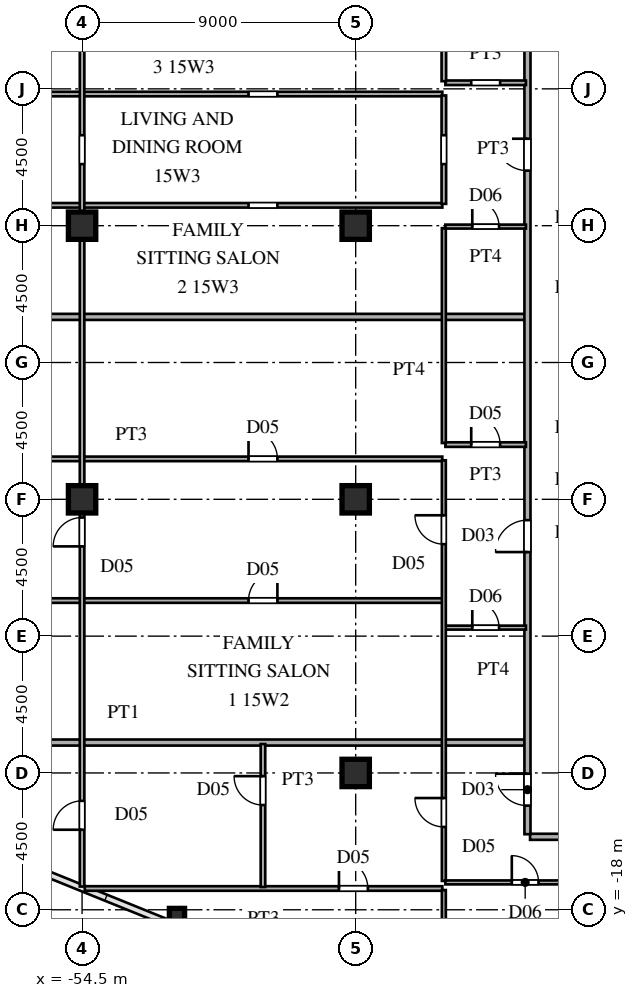
"""IFC4 building model, lengths in metres.
Left out: names, types, materials, properties, quantities, classifications, styles, units other than length and angle.
Written with IfcOpenShell. Run it as: python <this file> out.ifc"""

import sys

from ifc_helpers import new_model, si_unit, direction, frame, frame_2d, origin, origin_2d, place, context, subcontext, project, spatial, rectangle, hollow_rectangle, i_section, extrude, source, transform, mapped, element, fill, save


model = new_model("IFC4")
c1 = context("Model", 3, precision=1e-05, world=origin(), true_north=direction((0.0, 1.0)))
c2 = subcontext(c1, "Body", "Model", "MODEL_VIEW")
j1 = project(units=[si_unit("LENGTHUNIT", "METRE"), si_unit("PLANEANGLEUNIT", "RADIAN")], contexts=[c1])
p1 = place(None, origin())
s1 = spatial("IfcSite", under=j1, at=p1, CompositionType="ELEMENT")
p2 = place(p1, origin())
s2 = spatial("IfcBuilding", under=s1, at=p2, CompositionType="ELEMENT")
p3 = place(p2, frame((0.0, 0.0, 58.5)))
s3 = spatial("IfcBuildingStorey", under=s2, at=p3, CompositionType="ELEMENT", Elevation=58.5)
m1 = source(origin(), c2, "Body", "SweptSolid", [
    extrude(i_section(OverallWidth=0.9, OverallDepth=0.9, WebThickness=0.036, FlangeThickness=0.055, at=origin_2d()), origin(), (0.0, 0.0, 1.0), 3.6),
])
for number, where, z_axis, x_axis in (
    (1, (-45.5, -13.5, 0.0), (0.0, 0.0, 1.0), (1.0, 0.0, 0.0)),
    (2, (-45.5, -4.5, 0.0), (0.0, 0.0, 1.0), (1.0, 0.0, 0.0)),
    (3, (-45.5, 4.5, 0.0), (0.0, 0.0, 1.0), (1.0, 0.0, 0.0)),
    (4, (-54.5, -4.5, 0.0), (0.0, 0.0, 1.0), (1.0, 0.0, 0.0)),
    (5, (-54.5, 4.5, 0.0), (0.0, 0.0, 1.0), (1.0, 0.0, 0.0)),
):
    element("IfcColumn", number, at=place(p3, frame(where, z_axis=z_axis, x_axis=x_axis)), inside=s3, PredefinedType="COLUMN", context=c2, shape_type="MappedRepresentation", body=[
        mapped(m1, transform((0.0, 0.0, 0.0), scale=1.0)),
    ])
m2 = source(origin(), c2, "Body", "SweptSolid", [
    extrude(hollow_rectangle(XDim=0.5, YDim=0.5, WallThickness=0.02, at=origin_2d()), origin(), (0.0, 0.0, 1.0), 3.6),
])
p4 = place(p3, frame((-51.378, -18.204, 0.0), z_axis=(0.0, 0.0, 1.0), x_axis=(1.0, 0.0, 0.0)))
e6 = element("IfcColumn", 6, at=p4, inside=s3, PredefinedType="COLUMN", context=c2, shape_type="MappedRepresentation", body=[
    mapped(m2, transform((0.0, 0.0, 0.0), scale=1.0)),
])
p5 = place(p3, frame((-54.412, -17.3, 0.0), z_axis=(0.0, 0.0, 1.0), x_axis=(1.0, 0.0, 0.0)))
e7 = element("IfcWall", 7, at=p5, inside=s3, PredefinedType="PARTITIONING", context=c2, shape_type="SweptSolid", body=[
    extrude(rectangle(XDim=11.762, YDim=0.15, at=frame_2d((5.881, 0.0))), origin(), (0.0, 0.0, 1.0), 3.38),
])
p6 = place(p5, frame((8.362, 0.0, 0.0)))
e8 = element("IfcOpeningElement", 8, at=p6, cuts=e7, PredefinedType="OPENING", context=c2, shape_type="SweptSolid", body=[
    extrude(rectangle(XDim=0.95, YDim=2.15, at=frame_2d((0.475, 1.075))), frame((0.0, 0.085, 0.0), z_axis=(0.0, -1.0, 0.0), x_axis=(1.0, 0.0, 0.0)), (0.0, 0.0, 1.0), 0.17),
])
p7 = place(p3, frame((-42.55, -17.1, 0.0), z_axis=(0.0, 0.0, 1.0), x_axis=(1.0, 0.0, 0.0)))
e9 = element("IfcWall", 9, at=p7, inside=s3, PredefinedType="PARTITIONING", context=c2, shape_type="SweptSolid", body=[
    extrude(rectangle(XDim=5.25, YDim=0.13, at=frame_2d((2.625, 0.0))), origin(), (0.0, 0.0, 1.0), 3.38),
])
p8 = place(p7, frame((2.185, 0.0, 0.0)))
e10 = element("IfcOpeningElement", 10, at=p8, cuts=e9, PredefinedType="OPENING", context=c2, shape_type="SweptSolid", body=[
    extrude(rectangle(XDim=0.88, YDim=2.1, at=frame_2d((0.44, 1.05))), frame((0.0, 0.075, 0.0), z_axis=(0.0, -1.0, 0.0), x_axis=(1.0, 0.0, 0.0)), (0.0, 0.0, 1.0), 0.15),
])
p9 = place(p3, frame((-39.765, -15.6, 0.0), z_axis=(0.0, 0.0, 1.0), x_axis=(1.0, 0.0, 0.0)))
e11 = element("IfcWall", 11, at=p9, inside=s3, PredefinedType="PARTITIONING", context=c2, shape_type="SweptSolid", body=[
    extrude(rectangle(XDim=3.18, YDim=0.2, at=frame_2d((1.59, 0.0))), origin(), (0.0, 0.0, 1.0), 3.38),
])
p10 = place(p3, frame((-66.337, -12.5, 0.0), z_axis=(0.0, 0.0, 1.0), x_axis=(1.0, 0.0, 0.0)))
e12 = element("IfcWall", 12, at=p10, inside=s3, PredefinedType="PARTITIONING", context=c2, shape_type="SweptSolid", body=[
    extrude(rectangle(XDim=26.407, YDim=0.2, at=frame_2d((13.204, 0.0))), origin(), (0.0, 0.0, 1.0), 3.38),
])
p11 = place(p3, frame((-42.55, -8.72, 0.0), z_axis=(0.0, 0.0, 1.0), x_axis=(1.0, 0.0, 0.0)))
e13 = element("IfcWall", 13, at=p11, inside=s3, PredefinedType="PARTITIONING", context=c2, shape_type="SweptSolid", body=[
    extrude(rectangle(XDim=2.65, YDim=0.13, at=frame_2d((1.325, 0.0))), origin(), (0.0, 0.0, 1.0), 3.38),
])
p12 = place(p11, frame((0.885, 0.0, 0.0)))
e14 = element("IfcOpeningElement", 14, at=p12, cuts=e13, PredefinedType="OPENING", context=c2, shape_type="SweptSolid", body=[
    extrude(rectangle(XDim=0.88, YDim=2.1, at=frame_2d((0.44, 1.05))), frame((0.0, 0.075, 0.0), z_axis=(0.0, -1.0, 0.0), x_axis=(1.0, 0.0, 0.0)), (0.0, 0.0, 1.0), 0.15),
])
p13 = place(p3, frame((-72.535, -7.83, 0.0), z_axis=(0.0, 0.0, 1.0), x_axis=(1.0, 0.0, 0.0)))
e15 = element("IfcWall", 15, at=p13, inside=s3, PredefinedType="PARTITIONING", context=c2, shape_type="SweptSolid", body=[
    extrude(rectangle(XDim=29.885, YDim=0.15, at=frame_2d((14.942, 0.0))), origin(), (0.0, 0.0, 1.0), 3.38),
])
p14 = place(p13, frame((23.51, 0.0, 0.0)))
e16 = element("IfcOpeningElement", 16, at=p14, cuts=e15, PredefinedType="OPENING", context=c2, shape_type="SweptSolid", body=[
    extrude(rectangle(XDim=0.95, YDim=2.15, at=frame_2d((0.475, 1.075))), frame((0.0, 0.085, 0.0), z_axis=(0.0, -1.0, 0.0), x_axis=(1.0, 0.0, 0.0)), (0.0, 0.0, 1.0), 0.17),
])
p15 = place(p13, frame((15.731, 0.0, 0.0)))
e17 = element("IfcOpeningElement", 17, at=p15, cuts=e15, PredefinedType="OPENING", context=c2, shape_type="SweptSolid", body=[
    extrude(rectangle(XDim=0.95, YDim=2.15, at=frame_2d((0.475, 1.075))), frame((0.0, 0.085, 0.0), z_axis=(0.0, -1.0, 0.0), x_axis=(1.0, 0.0, 0.0)), (0.0, 0.0, 1.0), 0.17),
])
p16 = place(p3, frame((-72.535, -3.17, 0.0), z_axis=(0.0, 0.0, 1.0), x_axis=(1.0, 0.0, 0.0)))
e18 = element("IfcWall", 18, at=p16, inside=s3, PredefinedType="PARTITIONING", context=c2, shape_type="SweptSolid", body=[
    extrude(rectangle(XDim=29.885, YDim=0.15, at=frame_2d((14.942, 0.0))), origin(), (0.0, 0.0, 1.0), 3.38),
])
p17 = place(p16, frame((23.51, 0.0, 0.0)))
e19 = element("IfcOpeningElement", 19, at=p17, cuts=e18, PredefinedType="OPENING", context=c2, shape_type="SweptSolid", body=[
    extrude(rectangle(XDim=0.95, YDim=2.15, at=frame_2d((0.475, 1.075))), frame((0.0, 0.085, 0.0), z_axis=(0.0, -1.0, 0.0), x_axis=(1.0, 0.0, 0.0)), (0.0, 0.0, 1.0), 0.17),
])
p18 = place(p16, frame((14.71, 0.0, 0.0)))
e20 = element("IfcOpeningElement", 20, at=p18, cuts=e18, PredefinedType="OPENING", context=c2, shape_type="SweptSolid", body=[
    extrude(rectangle(XDim=0.95, YDim=2.15, at=frame_2d((0.475, 1.075))), frame((0.0, 0.085, 0.0), z_axis=(0.0, -1.0, 0.0), x_axis=(1.0, 0.0, 0.0)), (0.0, 0.0, 1.0), 0.17),
])
p19 = place(p3, frame((-42.55, -2.7, 0.0), z_axis=(0.0, 0.0, 1.0), x_axis=(1.0, 0.0, 0.0)))
e21 = element("IfcWall", 21, at=p19, inside=s3, PredefinedType="PARTITIONING", context=c2, shape_type="SweptSolid", body=[
    extrude(rectangle(XDim=2.65, YDim=0.15, at=frame_2d((1.325, 0.0))), origin(), (0.0, 0.0, 1.0), 3.38),
])
p20 = place(p19, frame((0.85, 0.0, 0.0)))
e22 = element("IfcOpeningElement", 22, at=p20, cuts=e21, PredefinedType="OPENING", context=c2, shape_type="SweptSolid", body=[
    extrude(rectangle(XDim=0.95, YDim=2.15, at=frame_2d((0.475, 1.075))), frame((0.0, 0.085, 0.0), z_axis=(0.0, -1.0, 0.0), x_axis=(1.0, 0.0, 0.0)), (0.0, 0.0, 1.0), 0.17),
])
p21 = place(p3, frame((-72.505, 1.5, 0.0), z_axis=(0.0, 0.0, 1.0), x_axis=(1.0, 0.0, 0.0)))
e23 = element("IfcWall", 23, at=p21, inside=s3, PredefinedType="PARTITIONING", context=c2, shape_type="SweptSolid", body=[
    extrude(rectangle(XDim=32.575, YDim=0.2, at=frame_2d((16.288, 0.0))), origin(), (0.0, 0.0, 1.0), 3.38),
])
p22 = place(p3, frame((-42.55, 4.47, 0.0), z_axis=(0.0, 0.0, 1.0), x_axis=(1.0, 0.0, 0.0)))
e24 = element("IfcWall", 24, at=p22, inside=s3, PredefinedType="PARTITIONING", context=c2, shape_type="SweptSolid", body=[
    extrude(rectangle(XDim=2.65, YDim=0.13, at=frame_2d((1.325, 0.0))), origin(), (0.0, 0.0, 1.0), 2.68),
])
p23 = place(p22, frame((0.885, 0.0, 0.0)))
e25 = element("IfcOpeningElement", 25, at=p23, cuts=e24, PredefinedType="OPENING", context=c2, shape_type="SweptSolid", body=[
    extrude(rectangle(XDim=0.88, YDim=2.1, at=frame_2d((0.44, 1.05))), frame((0.0, 0.075, 0.0), z_axis=(0.0, -1.0, 0.0), x_axis=(1.0, 0.0, 0.0)), (0.0, 0.0, 1.0), 0.15),
])
p24 = place(p3, frame((-72.535, 5.17, 0.0), z_axis=(0.0, 0.0, 1.0), x_axis=(1.0, 0.0, 0.0)))
e26 = element("IfcWall", 26, at=p24, inside=s3, PredefinedType="PARTITIONING", context=c2, shape_type="SweptSolid", body=[
    extrude(rectangle(XDim=29.885, YDim=0.15, at=frame_2d((14.942, 0.0))), origin(), (0.0, 0.0, 1.0), 3.38),
])
p25 = place(p24, frame((23.51, 0.0, 0.0)))
e27 = element("IfcOpeningElement", 27, at=p25, cuts=e26, PredefinedType="OPENING", context=c2, shape_type="SweptSolid", body=[
    extrude(rectangle(XDim=0.95, YDim=2.15, at=frame_2d((0.475, 1.075))), frame((0.0, 0.085, 0.0), z_axis=(0.0, -1.0, 0.0), x_axis=(1.0, 0.0, 0.0)), (0.0, 0.0, 1.0), 0.17),
])
p26 = place(p24, frame((14.71, 0.0, 0.0)))
e28 = element("IfcOpeningElement", 28, at=p26, cuts=e26, PredefinedType="OPENING", context=c2, shape_type="SweptSolid", body=[
    extrude(rectangle(XDim=0.95, YDim=2.15, at=frame_2d((0.475, 1.075))), frame((0.0, 0.085, 0.0), z_axis=(0.0, -1.0, 0.0), x_axis=(1.0, 0.0, 0.0)), (0.0, 0.0, 1.0), 0.17),
])
p27 = place(p3, frame((-72.535, 8.83, 0.0), z_axis=(0.0, 0.0, 1.0), x_axis=(1.0, 0.0, 0.0)))
e29 = element("IfcWall", 29, at=p27, inside=s3, PredefinedType="PARTITIONING", context=c2, shape_type="SweptSolid", body=[
    extrude(rectangle(XDim=29.885, YDim=0.15, at=frame_2d((14.942, 0.0))), origin(), (0.0, 0.0, 1.0), 3.38),
])
p28 = place(p27, frame((23.51, 0.0, 0.0)))
e30 = element("IfcOpeningElement", 30, at=p28, cuts=e29, PredefinedType="OPENING", context=c2, shape_type="SweptSolid", body=[
    extrude(rectangle(XDim=0.95, YDim=2.15, at=frame_2d((0.475, 1.075))), frame((0.0, 0.085, 0.0), z_axis=(0.0, -1.0, 0.0), x_axis=(1.0, 0.0, 0.0)), (0.0, 0.0, 1.0), 0.17),
])
p29 = place(p27, frame((14.856, 0.0, 0.0)))
e31 = element("IfcOpeningElement", 31, at=p29, cuts=e29, PredefinedType="OPENING", context=c2, shape_type="SweptSolid", body=[
    extrude(rectangle(XDim=0.95, YDim=2.15, at=frame_2d((0.475, 1.075))), frame((0.0, 0.085, 0.0), z_axis=(0.0, -1.0, 0.0), x_axis=(1.0, 0.0, 0.0)), (0.0, 0.0, 1.0), 0.17),
])
p30 = place(p3, frame((-42.55, 9.2, 0.0), z_axis=(0.0, 0.0, 1.0), x_axis=(1.0, 0.0, 0.0)))
e32 = element("IfcWall", 32, at=p30, inside=s3, PredefinedType="PARTITIONING", context=c2, shape_type="SweptSolid", body=[
    extrude(rectangle(XDim=2.65, YDim=0.15, at=frame_2d((1.325, 0.0))), origin(), (0.0, 0.0, 1.0), 3.38),
])
p31 = place(p30, frame((0.85, 0.0, 0.0)))
e33 = element("IfcOpeningElement", 33, at=p31, cuts=e32, PredefinedType="OPENING", context=c2, shape_type="SweptSolid", body=[
    extrude(rectangle(XDim=0.95, YDim=2.15, at=frame_2d((0.475, 1.075))), frame((0.0, 0.085, 0.0), z_axis=(0.0, -1.0, 0.0), x_axis=(1.0, 0.0, 0.0)), (0.0, 0.0, 1.0), 0.17),
])
p32 = place(p3, frame((-54.5, -17.236, 0.0), z_axis=(0.0, 0.0, 1.0), x_axis=(0.0, 1.0, 0.0)))
e34 = element("IfcWall", 34, at=p32, inside=s3, PredefinedType="PARTITIONING", context=c2, shape_type="SweptSolid", body=[
    extrude(rectangle(XDim=29.686, YDim=0.15, at=frame_2d((14.843, 0.0))), origin(), (0.0, 0.0, 1.0), 2.68),
])
p33 = place(p32, frame((1.868, 0.0, 0.0)))
e35 = element("IfcOpeningElement", 35, at=p33, cuts=e34, PredefinedType="OPENING", context=c2, shape_type="SweptSolid", body=[
    extrude(rectangle(XDim=0.95, YDim=2.15, at=frame_2d((0.475, 1.075))), frame((0.0, 0.085, 0.0), z_axis=(0.0, -1.0, 0.0), x_axis=(1.0, 0.0, 0.0)), (0.0, 0.0, 1.0), 0.17),
])
p34 = place(p32, frame((11.188, 0.0, 0.0)))
e36 = element("IfcOpeningElement", 36, at=p34, cuts=e34, PredefinedType="OPENING", context=c2, shape_type="SweptSolid", body=[
    extrude(rectangle(XDim=0.95, YDim=2.15, at=frame_2d((0.475, 1.075))), frame((0.0, 0.085, 0.0), z_axis=(0.0, -1.0, 0.0), x_axis=(1.0, 0.0, 0.0)), (0.0, 0.0, 1.0), 0.17),
])
p35 = place(p32, frame((23.761, 0.0, 0.0)))
e37 = element("IfcOpeningElement", 37, at=p35, cuts=e34, PredefinedType="OPENING", context=c2, shape_type="SweptSolid", body=[
    extrude(rectangle(XDim=0.95, YDim=2.15, at=frame_2d((0.475, 1.075))), frame((0.0, 0.085, 0.0), z_axis=(0.0, -1.0, 0.0), x_axis=(1.0, 0.0, 0.0)), (0.0, 0.0, 1.0), 0.17),
])
p36 = place(p3, frame((-48.55, -17.251, 0.0), z_axis=(0.0, 0.0, 1.0), x_axis=(0.0, 1.0, 0.0)))
e38 = element("IfcWall", 38, at=p36, inside=s3, PredefinedType="PARTITIONING", context=c2, shape_type="SweptSolid", body=[
    extrude(rectangle(XDim=4.701, YDim=0.15, at=frame_2d((2.351, 0.0))), origin(), (0.0, 0.0, 1.0), 3.38),
])
p37 = place(p36, frame((2.696, 0.0, 0.0)))
e39 = element("IfcOpeningElement", 39, at=p37, cuts=e38, PredefinedType="OPENING", context=c2, shape_type="SweptSolid", body=[
    extrude(rectangle(XDim=0.95, YDim=2.15, at=frame_2d((0.475, 1.075))), frame((0.0, 0.085, 0.0), z_axis=(0.0, -1.0, 0.0), x_axis=(1.0, 0.0, 0.0)), (0.0, 0.0, 1.0), 0.17),
])
p38 = place(p3, frame((-42.6, -22.137, 0.0), z_axis=(0.0, 0.0, 1.0), x_axis=(0.0, 1.0, 0.0)))
e40 = element("IfcWall", 40, at=p38, inside=s3, PredefinedType="PARTITIONING", context=c2, shape_type="SweptSolid", body=[
    extrude(rectangle(XDim=4.786, YDim=0.13, at=frame_2d((2.393, 0.0))), origin(), (0.0, 0.0, 1.0), 3.38),
])
p39 = place(p38, frame((0.886, 0.0, 0.0)))
e41 = element("IfcOpeningElement", 41, at=p39, cuts=e40, PredefinedType="OPENING", context=c2, shape_type="SweptSolid", body=[
    extrude(rectangle(XDim=0.95, YDim=2.15, at=frame_2d((0.475, 1.075))), frame((0.0, 0.075, 0.0), z_axis=(0.0, -1.0, 0.0), x_axis=(1.0, 0.0, 0.0)), (0.0, 0.0, 1.0), 0.15),
])
p40 = place(p3, frame((-42.6, -17.05, 0.0), z_axis=(0.0, 0.0, 1.0), x_axis=(0.0, 1.0, 0.0)))
e42 = element("IfcWall", 42, at=p40, inside=s3, PredefinedType="PARTITIONING", context=c2, shape_type="SweptSolid", body=[
    extrude(rectangle(XDim=13.833, YDim=0.13, at=frame_2d((6.917, 0.0))), origin(), (0.0, 0.0, 1.0), 3.38),
])
p41 = place(p40, frame((1.775, 0.0, 0.0)))
e43 = element("IfcOpeningElement", 43, at=p41, cuts=e42, PredefinedType="OPENING", context=c2, shape_type="SweptSolid", body=[
    extrude(rectangle(XDim=0.95, YDim=2.15, at=frame_2d((0.475, 1.075))), frame((0.0, 0.075, 0.0), z_axis=(0.0, -1.0, 0.0), x_axis=(1.0, 0.0, 0.0)), (0.0, 0.0, 1.0), 0.15),
])
p42 = place(p40, frame((11.075, 0.0, 0.0)))
e44 = element("IfcOpeningElement", 44, at=p42, cuts=e42, PredefinedType="OPENING", context=c2, shape_type="SweptSolid", body=[
    extrude(rectangle(XDim=0.95, YDim=2.15, at=frame_2d((0.475, 1.075))), frame((0.0, 0.075, 0.0), z_axis=(0.0, -1.0, 0.0), x_axis=(1.0, 0.0, 0.0)), (0.0, 0.0, 1.0), 0.15),
])
p43 = place(p3, frame((-42.6, -2.648, 0.0), z_axis=(0.0, 0.0, 1.0), x_axis=(0.0, 1.0, 0.0)))
e45 = element("IfcWall", 45, at=p43, inside=s3, PredefinedType="PARTITIONING", context=c2, shape_type="SweptSolid", body=[
    extrude(rectangle(XDim=7.066, YDim=0.13, at=frame_2d((3.533, 0.0))), origin(), (0.0, 0.0, 1.0), 3.38),
])
p44 = place(p3, frame((-42.6, 5.217, 0.0), z_axis=(0.0, 0.0, 1.0), x_axis=(0.0, 1.0, 0.0)))
e46 = element("IfcWall", 46, at=p44, inside=s3, PredefinedType="PARTITIONING", context=c2, shape_type="SweptSolid", body=[
    extrude(rectangle(XDim=3.566, YDim=0.15, at=frame_2d((1.783, 0.0))), origin(), (0.0, 0.0, 1.0), 3.38),
])
p45 = place(p44, frame((1.308, 0.0, 0.0)))
e47 = element("IfcOpeningElement", 47, at=p45, cuts=e46, PredefinedType="OPENING", context=c2, shape_type="SweptSolid", body=[
    extrude(rectangle(XDim=0.95, YDim=2.15, at=frame_2d((0.475, 1.075))), frame((0.0, 0.085, 0.0), z_axis=(0.0, -1.0, 0.0), x_axis=(1.0, 0.0, 0.0)), (0.0, 0.0, 1.0), 0.17),
])
p46 = place(p3, frame((-42.6, 9.252, 0.0), z_axis=(0.0, 0.0, 1.0), x_axis=(0.0, 1.0, 0.0)))
e48 = element("IfcWall", 48, at=p46, inside=s3, PredefinedType="PARTITIONING", context=c2, shape_type="SweptSolid", body=[
    extrude(rectangle(XDim=3.198, YDim=0.15, at=frame_2d((1.599, 0.0))), origin(), (0.0, 0.0, 1.0), 3.38),
])
p47 = place(p3, frame((-39.85, -15.515, 0.0), z_axis=(0.0, 0.0, 1.0), x_axis=(0.0, 1.0, 0.0)))
e49 = element("IfcWall", 49, at=p47, inside=s3, PredefinedType="PARTITIONING", context=c2, shape_type="SweptSolid", body=[
    extrude(rectangle(XDim=31.03, YDim=0.2, at=frame_2d((15.515, 0.0))), origin(), (0.0, 0.0, 1.0), 3.38),
])
p48 = place(p47, frame((0.94, 0.0, 0.0)))
e50 = element("IfcOpeningElement", 50, at=p48, cuts=e49, PredefinedType="OPENING", context=c2, shape_type="SweptSolid", body=[
    extrude(rectangle(XDim=1.05, YDim=2.25, at=frame_2d((0.525, 1.125))), frame((0.0, 0.11, 0.0), z_axis=(0.0, -1.0, 0.0), x_axis=(1.0, 0.0, 0.0)), (0.0, 0.0, 1.0), 0.22),
])
p49 = place(p47, frame((9.28, 0.0, 0.0)))
e51 = element("IfcOpeningElement", 51, at=p49, cuts=e49, PredefinedType="OPENING", context=c2, shape_type="SweptSolid", body=[
    extrude(rectangle(XDim=1.05, YDim=2.25, at=frame_2d((0.525, 1.125))), frame((0.0, 0.11, 0.0), z_axis=(0.0, -1.0, 0.0), x_axis=(1.0, 0.0, 0.0)), (0.0, 0.0, 1.0), 0.22),
])
p50 = place(p47, frame((21.825, 0.0, 0.0)))
e52 = element("IfcOpeningElement", 52, at=p50, cuts=e49, PredefinedType="OPENING", context=c2, shape_type="SweptSolid", body=[
    extrude(rectangle(XDim=1.05, YDim=2.25, at=frame_2d((0.525, 1.125))), frame((0.0, 0.11, 0.0), z_axis=(0.0, -1.0, 0.0), x_axis=(1.0, 0.0, 0.0)), (0.0, 0.0, 1.0), 0.22),
])
p51 = place(p47, frame((29.04, 0.0, 0.0)))
e53 = element("IfcOpeningElement", 53, at=p51, cuts=e49, PredefinedType="OPENING", context=c2, shape_type="SweptSolid", body=[
    extrude(rectangle(XDim=1.05, YDim=2.25, at=frame_2d((0.525, 1.125))), frame((0.0, 0.11, 0.0), z_axis=(0.0, -1.0, 0.0), x_axis=(1.0, 0.0, 0.0)), (0.0, 0.0, 1.0), 0.22),
])
m3 = source(origin(), c2, "Body", "SweptSolid", [
    extrude(rectangle(XDim=0.95, YDim=2.15, at=frame_2d((0.475, 1.075))), frame((0.0, 0.025, 0.0), z_axis=(0.0, -1.0, 0.0), x_axis=(1.0, 0.0, 0.0)), (0.0, 0.0, 1.0), 0.05),
])
p52 = place(p6, origin())
e54 = element("IfcDoor", 54, at=p52, inside=s3, OperationType="SINGLE_SWING_LEFT", PredefinedType="DOOR", context=c2, shape_type="MappedRepresentation", body=[
    mapped(m3, transform((0.0, 0.0, 0.0), scale=1.0)),
])
fill(e8, e54)
m4 = source(origin(), c2, "Body", "SweptSolid", [
    extrude(rectangle(XDim=0.88, YDim=2.1, at=frame_2d((0.44, 1.05))), frame((0.0, 0.025, 0.0), z_axis=(0.0, -1.0, 0.0), x_axis=(1.0, 0.0, 0.0)), (0.0, 0.0, 1.0), 0.05),
])
p53 = place(p8, origin())
e55 = element("IfcDoor", 55, at=p53, inside=s3, OperationType="SINGLE_SWING_LEFT", PredefinedType="DOOR", context=c2, shape_type="MappedRepresentation", body=[
    mapped(m4, transform((0.0, 0.0, 0.0), scale=1.0)),
])
fill(e10, e55)
p54 = place(p12, origin())
e56 = element("IfcDoor", 56, at=p54, inside=s3, OperationType="SINGLE_SWING_LEFT", PredefinedType="DOOR", context=c2, shape_type="MappedRepresentation", body=[
    mapped(m4, transform((0.0, 0.0, 0.0), scale=1.0)),
])
fill(e14, e56)
p55 = place(p14, origin())
e57 = element("IfcDoor", 57, at=p55, inside=s3, OperationType="SINGLE_SWING_RIGHT", PredefinedType="DOOR", context=c2, shape_type="MappedRepresentation", body=[
    mapped(m3, transform((0.0, 0.0, 0.0), scale=1.0)),
])
fill(e16, e57)
p56 = place(p17, origin())
e58 = element("IfcDoor", 58, at=p56, inside=s3, OperationType="SINGLE_SWING_LEFT", PredefinedType="DOOR", context=c2, shape_type="MappedRepresentation", body=[
    mapped(m3, transform((0.0, 0.0, 0.0), scale=1.0)),
])
fill(e19, e58)
p57 = place(p20, origin())
e59 = element("IfcDoor", 59, at=p57, inside=s3, OperationType="SINGLE_SWING_LEFT", PredefinedType="DOOR", context=c2, shape_type="MappedRepresentation", body=[
    mapped(m3, transform((0.0, 0.0, 0.0), scale=1.0)),
])
fill(e22, e59)
p58 = place(p23, origin())
e60 = element("IfcDoor", 60, at=p58, inside=s3, OperationType="SINGLE_SWING_LEFT", PredefinedType="DOOR", context=c2, shape_type="MappedRepresentation", body=[
    mapped(m4, transform((0.0, 0.0, 0.0), scale=1.0)),
])
fill(e25, e60)
p59 = place(p33, origin())
e61 = element("IfcDoor", 61, at=p59, inside=s3, OperationType="SINGLE_SWING_LEFT", PredefinedType="DOOR", context=c2, shape_type="MappedRepresentation", body=[
    mapped(m3, transform((0.0, 0.0, 0.0), scale=1.0)),
])
fill(e35, e61)
p60 = place(p34, origin())
e62 = element("IfcDoor", 62, at=p60, inside=s3, OperationType="SINGLE_SWING_LEFT", PredefinedType="DOOR", context=c2, shape_type="MappedRepresentation", body=[
    mapped(m3, transform((0.0, 0.0, 0.0), scale=1.0)),
])
fill(e36, e62)
p61 = place(p37, origin())
e63 = element("IfcDoor", 63, at=p61, inside=s3, OperationType="SINGLE_SWING_RIGHT", PredefinedType="DOOR", context=c2, shape_type="MappedRepresentation", body=[
    mapped(m3, transform((0.0, 0.0, 0.0), scale=1.0)),
])
fill(e39, e63)
p62 = place(p41, origin())
e64 = element("IfcDoor", 64, at=p62, inside=s3, OperationType="SINGLE_SWING_RIGHT", PredefinedType="DOOR", context=c2, shape_type="MappedRepresentation", body=[
    mapped(m3, transform((0.0, 0.0, 0.0), scale=1.0)),
])
fill(e43, e64)
p63 = place(p42, origin())
e65 = element("IfcDoor", 65, at=p63, inside=s3, OperationType="SINGLE_SWING_RIGHT", PredefinedType="DOOR", context=c2, shape_type="MappedRepresentation", body=[
    mapped(m3, transform((0.0, 0.0, 0.0), scale=1.0)),
])
fill(e44, e65)
m5 = source(origin(), c2, "Body", "SweptSolid", [
    extrude(rectangle(XDim=1.05, YDim=2.25, at=frame_2d((0.525, 1.125))), frame((0.0, 0.025, 0.0), z_axis=(0.0, -1.0, 0.0), x_axis=(1.0, 0.0, 0.0)), (0.0, 0.0, 1.0), 0.05),
])
p64 = place(p48, origin())
e66 = element("IfcDoor", 66, at=p64, inside=s3, OperationType="SINGLE_SWING_RIGHT", PredefinedType="DOOR", context=c2, shape_type="MappedRepresentation", body=[
    mapped(m5, transform((0.0, 0.0, 0.0), scale=1.0)),
])
fill(e50, e66)
p65 = place(p49, origin())
e67 = element("IfcDoor", 67, at=p65, inside=s3, OperationType="SINGLE_SWING_LEFT", PredefinedType="DOOR", context=c2, shape_type="MappedRepresentation", body=[
    mapped(m5, transform((0.0, 0.0, 0.0), scale=1.0)),
])
fill(e51, e67)
p66 = place(p50, origin())
e68 = element("IfcDoor", 68, at=p66, inside=s3, OperationType="SINGLE_SWING_RIGHT", PredefinedType="DOOR", context=c2, shape_type="MappedRepresentation", body=[
    mapped(m5, transform((0.0, 0.0, 0.0), scale=1.0)),
])
fill(e52, e68)
save(model, sys.argv[1])
